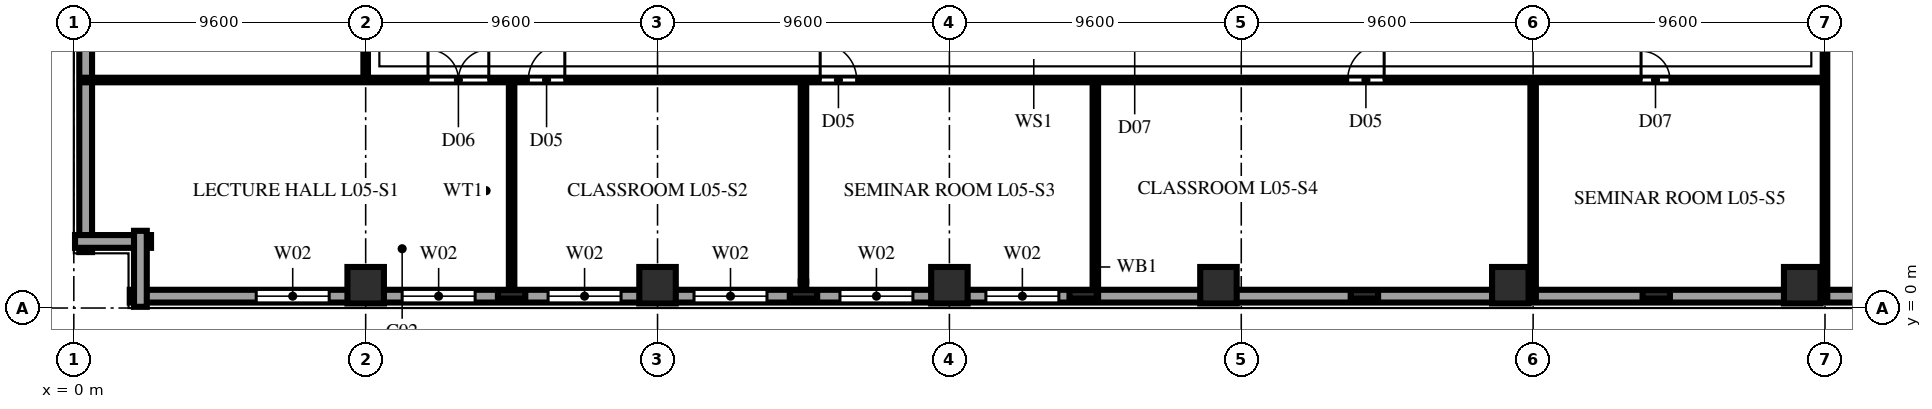
"""IFC4 building model, lengths in metres.
Left out: names, types, materials, properties, quantities, classifications, styles, units other than length and angle.
Written with IfcOpenShell. Run it as: python <this file> out.ifc"""

import sys

from ifc_helpers import new_model, si_unit, direction, frame, frame_2d, origin, origin_2d, place, context, subcontext, project, spatial, rectangle, extrude, element, fill, save


model = new_model("IFC4")
c1 = context("Model", 3, precision=1e-05, world=origin(), true_north=direction((0.0, 1.0)))
c2 = subcontext(c1, "Body", "Model", "MODEL_VIEW")
j1 = project(units=[si_unit("LENGTHUNIT", "METRE"), si_unit("PLANEANGLEUNIT", "RADIAN")], contexts=[c1])
p1 = place(None, origin())
s1 = spatial("IfcSite", under=j1, at=p1, CompositionType="ELEMENT")
p2 = place(p1, origin())
s2 = spatial("IfcBuilding", under=s1, at=p2, CompositionType="ELEMENT")
p3 = place(p2, frame((0.0, 0.0, 24.2)))
s3 = spatial("IfcBuildingStorey", under=s2, at=p3, CompositionType="ELEMENT", Elevation=24.2)
for number, where, z_axis, x_axis in (
    (1, (9.6, 0.75, 0.0), (0.0, 0.0, 1.0), (1.0, 0.0, 0.0)),
    (2, (19.2, 0.75, 0.0), (0.0, 0.0, 1.0), (1.0, 0.0, 0.0)),
    (3, (28.8, 0.75, 0.0), (0.0, 0.0, 1.0), (1.0, 0.0, 0.0)),
    (4, (37.65, 0.75, 0.0), (0.0, 0.0, 1.0), (1.0, 0.0, 0.0)),
    (5, (47.25, 0.75, 0.0), (0.0, 0.0, 1.0), (1.0, 0.0, 0.0)),
    (6, (56.85, 0.75, 0.0), (0.0, 0.0, 1.0), (1.0, 0.0, 0.0)),
):
    element("IfcColumn", number, at=place(p3, frame(where, z_axis=z_axis, x_axis=x_axis)), inside=s3, PredefinedType="COLUMN", context=c2, shape_type="SweptSolid", body=[
        extrude(rectangle(XDim=1.2, YDim=1.2, at=origin_2d()), origin(), (0.0, 0.0, 1.0), 3.8),
    ])
for number, where, z_axis, x_axis in (
    (7, (14.4, 0.45, 0.0), (0.0, 0.0, 1.0), (1.0, 0.0, 0.0)),
    (8, (24.0, 0.45, 0.0), (0.0, 0.0, 1.0), (1.0, 0.0, 0.0)),
    (9, (33.2, 0.45, 0.0), (0.0, 0.0, 1.0), (1.0, 0.0, 0.0)),
    (10, (42.45, 0.45, 0.0), (0.0, 0.0, 1.0), (1.0, 0.0, 0.0)),
    (11, (52.05, 0.45, 0.0), (0.0, 0.0, 1.0), (1.0, 0.0, 0.0)),
):
    element("IfcColumn", number, at=place(p3, frame(where, z_axis=z_axis, x_axis=x_axis)), inside=s3, PredefinedType="PILASTER", context=c2, shape_type="SweptSolid", body=[
        extrude(rectangle(XDim=0.9, YDim=0.28, at=origin_2d()), origin(), (0.0, 0.0, 1.0), 3.8),
    ])
p4 = place(p3, frame((1.84, 0.39, 0.0), z_axis=(0.0, 0.0, 1.0), x_axis=(1.0, 0.0, 0.0)))
e12 = element("IfcWall", 12, at=p4, inside=s3, PredefinedType="SOLIDWALL", context=c2, shape_type="SweptSolid", body=[
    extrude(rectangle(XDim=63.52, YDim=0.42, at=frame_2d((31.76, 0.0))), origin(), (0.0, 0.0, 1.0), 3.54),
])
p5 = place(p4, frame((4.16, 0.0, 0.85)))
e13 = element("IfcOpeningElement", 13, at=p5, cuts=e12, PredefinedType="OPENING", context=c2, shape_type="SweptSolid", body=[
    extrude(rectangle(XDim=2.4, YDim=1.85, at=frame_2d((1.2, 0.925))), frame((0.0, 0.222, 0.0), z_axis=(0.0, -1.0, 0.0), x_axis=(1.0, 0.0, 0.0)), (0.0, 0.0, 1.0), 0.444),
])
p6 = place(p4, frame((8.96, 0.0, 0.85)))
e14 = element("IfcOpeningElement", 14, at=p6, cuts=e12, PredefinedType="OPENING", context=c2, shape_type="SweptSolid", body=[
    extrude(rectangle(XDim=2.4, YDim=1.85, at=frame_2d((1.2, 0.925))), frame((0.0, 0.222, 0.0), z_axis=(0.0, -1.0, 0.0), x_axis=(1.0, 0.0, 0.0)), (0.0, 0.0, 1.0), 0.444),
])
p7 = place(p4, frame((13.76, 0.0, 0.85)))
e15 = element("IfcOpeningElement", 15, at=p7, cuts=e12, PredefinedType="OPENING", context=c2, shape_type="SweptSolid", body=[
    extrude(rectangle(XDim=2.4, YDim=1.85, at=frame_2d((1.2, 0.925))), frame((0.0, 0.222, 0.0), z_axis=(0.0, -1.0, 0.0), x_axis=(1.0, 0.0, 0.0)), (0.0, 0.0, 1.0), 0.444),
])
p8 = place(p4, frame((18.56, 0.0, 0.85)))
e16 = element("IfcOpeningElement", 16, at=p8, cuts=e12, PredefinedType="OPENING", context=c2, shape_type="SweptSolid", body=[
    extrude(rectangle(XDim=2.4, YDim=1.85, at=frame_2d((1.2, 0.925))), frame((0.0, 0.222, 0.0), z_axis=(0.0, -1.0, 0.0), x_axis=(1.0, 0.0, 0.0)), (0.0, 0.0, 1.0), 0.444),
])
p9 = place(p4, frame((23.36, 0.0, 0.85)))
e17 = element("IfcOpeningElement", 17, at=p9, cuts=e12, PredefinedType="OPENING", context=c2, shape_type="SweptSolid", body=[
    extrude(rectangle(XDim=2.4, YDim=1.85, at=frame_2d((1.2, 0.925))), frame((0.0, 0.222, 0.0), z_axis=(0.0, -1.0, 0.0), x_axis=(1.0, 0.0, 0.0)), (0.0, 0.0, 1.0), 0.444),
])
p10 = place(p4, frame((28.16, 0.0, 0.85)))
e18 = element("IfcOpeningElement", 18, at=p10, cuts=e12, PredefinedType="OPENING", context=c2, shape_type="SweptSolid", body=[
    extrude(rectangle(XDim=2.4, YDim=1.85, at=frame_2d((1.2, 0.925))), frame((0.0, 0.222, 0.0), z_axis=(0.0, -1.0, 0.0), x_axis=(1.0, 0.0, 0.0)), (0.0, 0.0, 1.0), 0.444),
])
p11 = place(p3, frame((0.39, 65.36, 0.0), z_axis=(0.0, 0.0, 1.0), x_axis=(0.0, -1.0, 0.0)))
e19 = element("IfcWall", 19, at=p11, inside=s3, PredefinedType="SOLIDWALL", context=c2, shape_type="SweptSolid", body=[
    extrude(rectangle(XDim=63.52, YDim=0.42, at=frame_2d((31.76, 0.0))), origin(), (0.0, 0.0, 1.0), 3.54),
])
p12 = place(p11, frame((4.885, 0.0, 0.9)))
e20 = element("IfcOpeningElement", 20, at=p12, cuts=e19, PredefinedType="OPENING", context=c2, shape_type="SweptSolid", body=[
    extrude(rectangle(XDim=0.95, YDim=1.85, at=frame_2d((0.475, 0.925))), frame((0.0, 0.222, 0.0), z_axis=(0.0, -1.0, 0.0), x_axis=(1.0, 0.0, 0.0)), (0.0, 0.0, 1.0), 0.444),
])
p13 = place(p11, frame((9.41, 0.0, 0.9)))
e21 = element("IfcOpeningElement", 21, at=p13, cuts=e19, PredefinedType="OPENING", context=c2, shape_type="SweptSolid", body=[
    extrude(rectangle(XDim=1.5, YDim=1.85, at=frame_2d((0.75, 0.925))), frame((0.0, 0.222, 0.0), z_axis=(0.0, -1.0, 0.0), x_axis=(1.0, 0.0, 0.0)), (0.0, 0.0, 1.0), 0.444),
])
p14 = place(p11, frame((14.485, 0.0, 0.9)))
e22 = element("IfcOpeningElement", 22, at=p14, cuts=e19, PredefinedType="OPENING", context=c2, shape_type="SweptSolid", body=[
    extrude(rectangle(XDim=0.95, YDim=1.85, at=frame_2d((0.475, 0.925))), frame((0.0, 0.222, 0.0), z_axis=(0.0, -1.0, 0.0), x_axis=(1.0, 0.0, 0.0)), (0.0, 0.0, 1.0), 0.444),
])
p15 = place(p11, frame((19.01, 0.0, 0.9)))
e23 = element("IfcOpeningElement", 23, at=p15, cuts=e19, PredefinedType="OPENING", context=c2, shape_type="SweptSolid", body=[
    extrude(rectangle(XDim=1.5, YDim=1.85, at=frame_2d((0.75, 0.925))), frame((0.0, 0.222, 0.0), z_axis=(0.0, -1.0, 0.0), x_axis=(1.0, 0.0, 0.0)), (0.0, 0.0, 1.0), 0.444),
])
p16 = place(p11, frame((24.085, 0.0, 0.9)))
e24 = element("IfcOpeningElement", 24, at=p16, cuts=e19, PredefinedType="OPENING", context=c2, shape_type="SweptSolid", body=[
    extrude(rectangle(XDim=0.95, YDim=1.85, at=frame_2d((0.475, 0.925))), frame((0.0, 0.222, 0.0), z_axis=(0.0, -1.0, 0.0), x_axis=(1.0, 0.0, 0.0)), (0.0, 0.0, 1.0), 0.444),
])
p17 = place(p11, frame((28.61, 0.0, 0.9)))
e25 = element("IfcOpeningElement", 25, at=p17, cuts=e19, PredefinedType="OPENING", context=c2, shape_type="SweptSolid", body=[
    extrude(rectangle(XDim=1.5, YDim=1.85, at=frame_2d((0.75, 0.925))), frame((0.0, 0.222, 0.0), z_axis=(0.0, -1.0, 0.0), x_axis=(1.0, 0.0, 0.0)), (0.0, 0.0, 1.0), 0.444),
])
p18 = place(p11, frame((33.685, 0.0, 0.9)))
e26 = element("IfcOpeningElement", 26, at=p18, cuts=e19, PredefinedType="OPENING", context=c2, shape_type="SweptSolid", body=[
    extrude(rectangle(XDim=0.95, YDim=1.85, at=frame_2d((0.475, 0.925))), frame((0.0, 0.222, 0.0), z_axis=(0.0, -1.0, 0.0), x_axis=(1.0, 0.0, 0.0)), (0.0, 0.0, 1.0), 0.444),
])
p19 = place(p11, frame((38.21, 0.0, 0.9)))
e27 = element("IfcOpeningElement", 27, at=p19, cuts=e19, PredefinedType="OPENING", context=c2, shape_type="SweptSolid", body=[
    extrude(rectangle(XDim=1.5, YDim=1.85, at=frame_2d((0.75, 0.925))), frame((0.0, 0.222, 0.0), z_axis=(0.0, -1.0, 0.0), x_axis=(1.0, 0.0, 0.0)), (0.0, 0.0, 1.0), 0.444),
])
p20 = place(p11, frame((43.285, 0.0, 0.9)))
e28 = element("IfcOpeningElement", 28, at=p20, cuts=e19, PredefinedType="OPENING", context=c2, shape_type="SweptSolid", body=[
    extrude(rectangle(XDim=0.95, YDim=1.85, at=frame_2d((0.475, 0.925))), frame((0.0, 0.222, 0.0), z_axis=(0.0, -1.0, 0.0), x_axis=(1.0, 0.0, 0.0)), (0.0, 0.0, 1.0), 0.444),
])
p21 = place(p11, frame((47.81, 0.0, 0.9)))
e29 = element("IfcOpeningElement", 29, at=p21, cuts=e19, PredefinedType="OPENING", context=c2, shape_type="SweptSolid", body=[
    extrude(rectangle(XDim=1.5, YDim=1.85, at=frame_2d((0.75, 0.925))), frame((0.0, 0.222, 0.0), z_axis=(0.0, -1.0, 0.0), x_axis=(1.0, 0.0, 0.0)), (0.0, 0.0, 1.0), 0.444),
])
p22 = place(p11, frame((52.885, 0.0, 0.9)))
e30 = element("IfcOpeningElement", 30, at=p22, cuts=e19, PredefinedType="OPENING", context=c2, shape_type="SweptSolid", body=[
    extrude(rectangle(XDim=0.95, YDim=1.85, at=frame_2d((0.475, 0.925))), frame((0.0, 0.222, 0.0), z_axis=(0.0, -1.0, 0.0), x_axis=(1.0, 0.0, 0.0)), (0.0, 0.0, 1.0), 0.444),
])
for number, where, z_axis, x_axis in (
    (31, (0.04, 2.19, 0.0), (0.0, 0.0, 1.0), (1.0, 0.0, 0.0)),
    (32, (2.19, 2.54, 0.0), (0.0, 0.0, 1.0), (0.0, -1.0, 0.0)),
):
    element("IfcWall", number, at=place(p3, frame(where, z_axis=z_axis, x_axis=x_axis)), inside=s3, PredefinedType="SOLIDWALL", context=c2, shape_type="SweptSolid", body=[
        extrude(rectangle(XDim=2.5, YDim=0.42, at=frame_2d((1.25, 0.0))), origin(), (0.0, 0.0, 1.0), 3.54),
    ])
p23 = place(p3, frame((9.6, 7.5, 0.0), z_axis=(0.0, 0.0, 1.0), x_axis=(0.0, 1.0, 0.0)))
e33 = element("IfcWall", 33, at=p23, inside=s3, PredefinedType="PARTITIONING", context=c2, shape_type="SweptSolid", body=[
    extrude(rectangle(XDim=2.1, YDim=0.15, at=frame_2d((1.05, 0.0))), origin(), (0.0, 0.0, 1.0), 2.923),
])
p24 = place(p3, frame((14.4, 0.22, 0.0), z_axis=(0.0, 0.0, 1.0), x_axis=(0.0, 1.0, 0.0)))
e34 = element("IfcWall", 34, at=p24, inside=s3, PredefinedType="PARTITIONING", context=c2, shape_type="SweptSolid", body=[
    extrude(rectangle(XDim=7.28, YDim=0.18, at=frame_2d((3.64, 0.0))), origin(), (0.0, 0.0, 1.0), 3.54),
])
p25 = place(p3, frame((24.0, 0.22, 0.0), z_axis=(0.0, 0.0, 1.0), x_axis=(0.0, 1.0, 0.0)))
e35 = element("IfcWall", 35, at=p25, inside=s3, PredefinedType="PARTITIONING", context=c2, shape_type="SweptSolid", body=[
    extrude(rectangle(XDim=0.645, YDim=0.18, at=frame_2d((0.323, 0.0))), origin(), (0.0, 0.0, 1.0), 3.54),
])
p26 = place(p3, frame((24.0, 0.865, 0.0), z_axis=(0.0, 0.0, 1.0), x_axis=(0.0, 1.0, 0.0)))
e36 = element("IfcWall", 36, at=p26, inside=s3, PredefinedType="PARTITIONING", context=c2, shape_type="SweptSolid", body=[
    extrude(rectangle(XDim=6.635, YDim=0.18, at=frame_2d((3.317, 0.0))), origin(), (0.0, 0.0, 1.0), 3.007),
])
for number, where, z_axis, x_axis in (
    (37, (33.6, 0.22, 0.0), (0.0, 0.0, 1.0), (0.0, 1.0, 0.0)),
    (38, (48.0, 0.22, 0.0), (0.0, 0.0, 1.0), (0.0, 1.0, 0.0)),
):
    element("IfcWall", number, at=place(p3, frame(where, z_axis=z_axis, x_axis=x_axis)), inside=s3, PredefinedType="PARTITIONING", context=c2, shape_type="SweptSolid", body=[
        extrude(rectangle(XDim=7.28, YDim=0.18, at=frame_2d((3.64, 0.0))), origin(), (0.0, 0.0, 1.0), 3.54),
    ])
p27 = place(p3, frame((0.22, 7.5, 0.0), z_axis=(0.0, 0.0, 1.0), x_axis=(1.0, 0.0, 0.0)))
e39 = element("IfcWall", 39, at=p27, inside=s3, PredefinedType="PARTITIONING", context=c2, shape_type="SweptSolid", body=[
    extrude(rectangle(XDim=57.38, YDim=0.15, at=frame_2d((28.69, 0.0))), origin(), (0.0, 0.0, 1.0), 3.54),
])
p28 = place(p27, frame((11.43, 0.0, 0.0)))
e40 = element("IfcOpeningElement", 40, at=p28, cuts=e39, PredefinedType="OPENING", context=c2, shape_type="SweptSolid", body=[
    extrude(rectangle(XDim=2.0, YDim=2.3, at=frame_2d((1.0, 1.15))), frame((0.0, 0.087, 0.0), z_axis=(0.0, -1.0, 0.0), x_axis=(1.0, 0.0, 0.0)), (0.0, 0.0, 1.0), 0.174),
])
p29 = place(p27, frame((14.73, 0.0, 0.0)))
e41 = element("IfcOpeningElement", 41, at=p29, cuts=e39, PredefinedType="OPENING", context=c2, shape_type="SweptSolid", body=[
    extrude(rectangle(XDim=1.2, YDim=2.2, at=frame_2d((0.6, 1.1))), frame((0.0, 0.087, 0.0), z_axis=(0.0, -1.0, 0.0), x_axis=(1.0, 0.0, 0.0)), (0.0, 0.0, 1.0), 0.174),
])
p30 = place(p27, frame((24.33, 0.0, 0.0)))
e42 = element("IfcOpeningElement", 42, at=p30, cuts=e39, PredefinedType="OPENING", context=c2, shape_type="SweptSolid", body=[
    extrude(rectangle(XDim=1.2, YDim=2.2, at=frame_2d((0.6, 1.1))), frame((0.0, 0.087, 0.0), z_axis=(0.0, -1.0, 0.0), x_axis=(1.0, 0.0, 0.0)), (0.0, 0.0, 1.0), 0.174),
])
p31 = place(p27, frame((41.68, 0.0, 0.0)))
e43 = element("IfcOpeningElement", 43, at=p31, cuts=e39, PredefinedType="OPENING", context=c2, shape_type="SweptSolid", body=[
    extrude(rectangle(XDim=1.2, YDim=2.2, at=frame_2d((0.6, 1.1))), frame((0.0, 0.087, 0.0), z_axis=(0.0, -1.0, 0.0), x_axis=(1.0, 0.0, 0.0)), (0.0, 0.0, 1.0), 0.174),
])
p32 = place(p27, frame((51.33, 0.0, 0.0)))
e44 = element("IfcOpeningElement", 44, at=p32, cuts=e39, PredefinedType="OPENING", context=c2, shape_type="SweptSolid", body=[
    extrude(rectangle(XDim=0.95, YDim=2.15, at=frame_2d((0.475, 1.075))), frame((0.0, 0.087, 0.0), z_axis=(0.0, -1.0, 0.0), x_axis=(1.0, 0.0, 0.0)), (0.0, 0.0, 1.0), 0.174),
])
p33 = place(p3, frame((57.6, 0.22, 0.0), z_axis=(0.0, 0.0, 1.0), x_axis=(0.0, 1.0, 0.0)))
e45 = element("IfcWall", 45, at=p33, inside=s3, PredefinedType="PARTITIONING", context=c2, shape_type="SweptSolid", body=[
    extrude(rectangle(XDim=37.96, YDim=0.15, at=frame_2d((18.98, 0.0))), origin(), (0.0, 0.0, 1.0), 3.54),
])
p34 = place(p33, frame((13.58, 0.0, 0.0)))
e46 = element("IfcOpeningElement", 46, at=p34, cuts=e45, PredefinedType="OPENING", context=c2, shape_type="SweptSolid", body=[
    extrude(rectangle(XDim=0.95, YDim=2.15, at=frame_2d((0.475, 1.075))), frame((0.0, 0.087, 0.0), z_axis=(0.0, -1.0, 0.0), x_axis=(1.0, 0.0, 0.0)), (0.0, 0.0, 1.0), 0.174),
])
p35 = place(p5, origin())
e47 = element("IfcWindow", 47, at=p35, inside=s3, PartitioningType="TRIPLE_PANEL_VERTICAL", PredefinedType="WINDOW", context=c2, shape_type="SweptSolid", body=[
    extrude(rectangle(XDim=2.4, YDim=1.85, at=frame_2d((1.2, 0.925))), frame((0.0, 0.11, 0.0), z_axis=(0.0, -1.0, 0.0), x_axis=(1.0, 0.0, 0.0)), (0.0, 0.0, 1.0), 0.06),
])
fill(e13, e47)
p36 = place(p6, origin())
e48 = element("IfcWindow", 48, at=p36, inside=s3, PartitioningType="TRIPLE_PANEL_VERTICAL", PredefinedType="WINDOW", context=c2, shape_type="SweptSolid", body=[
    extrude(rectangle(XDim=2.4, YDim=1.85, at=frame_2d((1.2, 0.925))), frame((0.0, 0.11, 0.0), z_axis=(0.0, -1.0, 0.0), x_axis=(1.0, 0.0, 0.0)), (0.0, 0.0, 1.0), 0.06),
])
fill(e14, e48)
p37 = place(p7, origin())
e49 = element("IfcWindow", 49, at=p37, inside=s3, PartitioningType="TRIPLE_PANEL_VERTICAL", PredefinedType="WINDOW", context=c2, shape_type="SweptSolid", body=[
    extrude(rectangle(XDim=2.4, YDim=1.85, at=frame_2d((1.2, 0.925))), frame((0.0, 0.11, 0.0), z_axis=(0.0, -1.0, 0.0), x_axis=(1.0, 0.0, 0.0)), (0.0, 0.0, 1.0), 0.06),
])
fill(e15, e49)
p38 = place(p8, origin())
e50 = element("IfcWindow", 50, at=p38, inside=s3, PartitioningType="TRIPLE_PANEL_VERTICAL", PredefinedType="WINDOW", context=c2, shape_type="SweptSolid", body=[
    extrude(rectangle(XDim=2.4, YDim=1.85, at=frame_2d((1.2, 0.925))), frame((0.0, 0.11, 0.0), z_axis=(0.0, -1.0, 0.0), x_axis=(1.0, 0.0, 0.0)), (0.0, 0.0, 1.0), 0.06),
])
fill(e16, e50)
p39 = place(p9, origin())
e51 = element("IfcWindow", 51, at=p39, inside=s3, PartitioningType="TRIPLE_PANEL_VERTICAL", PredefinedType="WINDOW", context=c2, shape_type="SweptSolid", body=[
    extrude(rectangle(XDim=2.4, YDim=1.85, at=frame_2d((1.2, 0.925))), frame((0.0, 0.11, 0.0), z_axis=(0.0, -1.0, 0.0), x_axis=(1.0, 0.0, 0.0)), (0.0, 0.0, 1.0), 0.06),
])
fill(e17, e51)
p40 = place(p10, origin())
e52 = element("IfcWindow", 52, at=p40, inside=s3, PartitioningType="TRIPLE_PANEL_VERTICAL", PredefinedType="WINDOW", context=c2, shape_type="SweptSolid", body=[
    extrude(rectangle(XDim=2.4, YDim=1.85, at=frame_2d((1.2, 0.925))), frame((0.0, 0.11, 0.0), z_axis=(0.0, -1.0, 0.0), x_axis=(1.0, 0.0, 0.0)), (0.0, 0.0, 1.0), 0.06),
])
fill(e18, e52)
p41 = place(p28, origin())
e53 = element("IfcDoor", 53, at=p41, inside=s3, OperationType="DOUBLE_SWING_LEFT", PredefinedType="DOOR", context=c2, shape_type="SweptSolid", body=[
    extrude(rectangle(XDim=2.0, YDim=2.3, at=frame_2d((1.0, 1.15))), frame((0.0, 0.025, 0.0), z_axis=(0.0, -1.0, 0.0), x_axis=(1.0, 0.0, 0.0)), (0.0, 0.0, 1.0), 0.05),
])
fill(e40, e53)
p42 = place(p29, origin())
e54 = element("IfcDoor", 54, at=p42, inside=s3, OperationType="SINGLE_SWING_RIGHT", PredefinedType="DOOR", context=c2, shape_type="SweptSolid", body=[
    extrude(rectangle(XDim=1.2, YDim=2.2, at=frame_2d((0.6, 1.1))), frame((0.0, 0.025, 0.0), z_axis=(0.0, -1.0, 0.0), x_axis=(1.0, 0.0, 0.0)), (0.0, 0.0, 1.0), 0.05),
])
fill(e41, e54)
p43 = place(p30, origin())
e55 = element("IfcDoor", 55, at=p43, inside=s3, OperationType="SINGLE_SWING_LEFT", PredefinedType="DOOR", context=c2, shape_type="SweptSolid", body=[
    extrude(rectangle(XDim=1.2, YDim=2.2, at=frame_2d((0.6, 1.1))), frame((0.0, 0.025, 0.0), z_axis=(0.0, -1.0, 0.0), x_axis=(1.0, 0.0, 0.0)), (0.0, 0.0, 1.0), 0.05),
])
fill(e42, e55)
p44 = place(p31, origin())
e56 = element("IfcDoor", 56, at=p44, inside=s3, OperationType="SINGLE_SWING_RIGHT", PredefinedType="DOOR", context=c2, shape_type="SweptSolid", body=[
    extrude(rectangle(XDim=1.2, YDim=2.2, at=frame_2d((0.6, 1.1))), frame((0.0, 0.025, 0.0), z_axis=(0.0, -1.0, 0.0), x_axis=(1.0, 0.0, 0.0)), (0.0, 0.0, 1.0), 0.05),
])
fill(e43, e56)
p45 = place(p32, origin())
e57 = element("IfcDoor", 57, at=p45, inside=s3, OperationType="SINGLE_SWING_LEFT", PredefinedType="DOOR", context=c2, shape_type="SweptSolid", body=[
    extrude(rectangle(XDim=0.95, YDim=2.15, at=frame_2d((0.475, 1.075))), frame((0.0, 0.025, 0.0), z_axis=(0.0, -1.0, 0.0), x_axis=(1.0, 0.0, 0.0)), (0.0, 0.0, 1.0), 0.05),
])
fill(e44, e57)
save(model, sys.argv[1])
